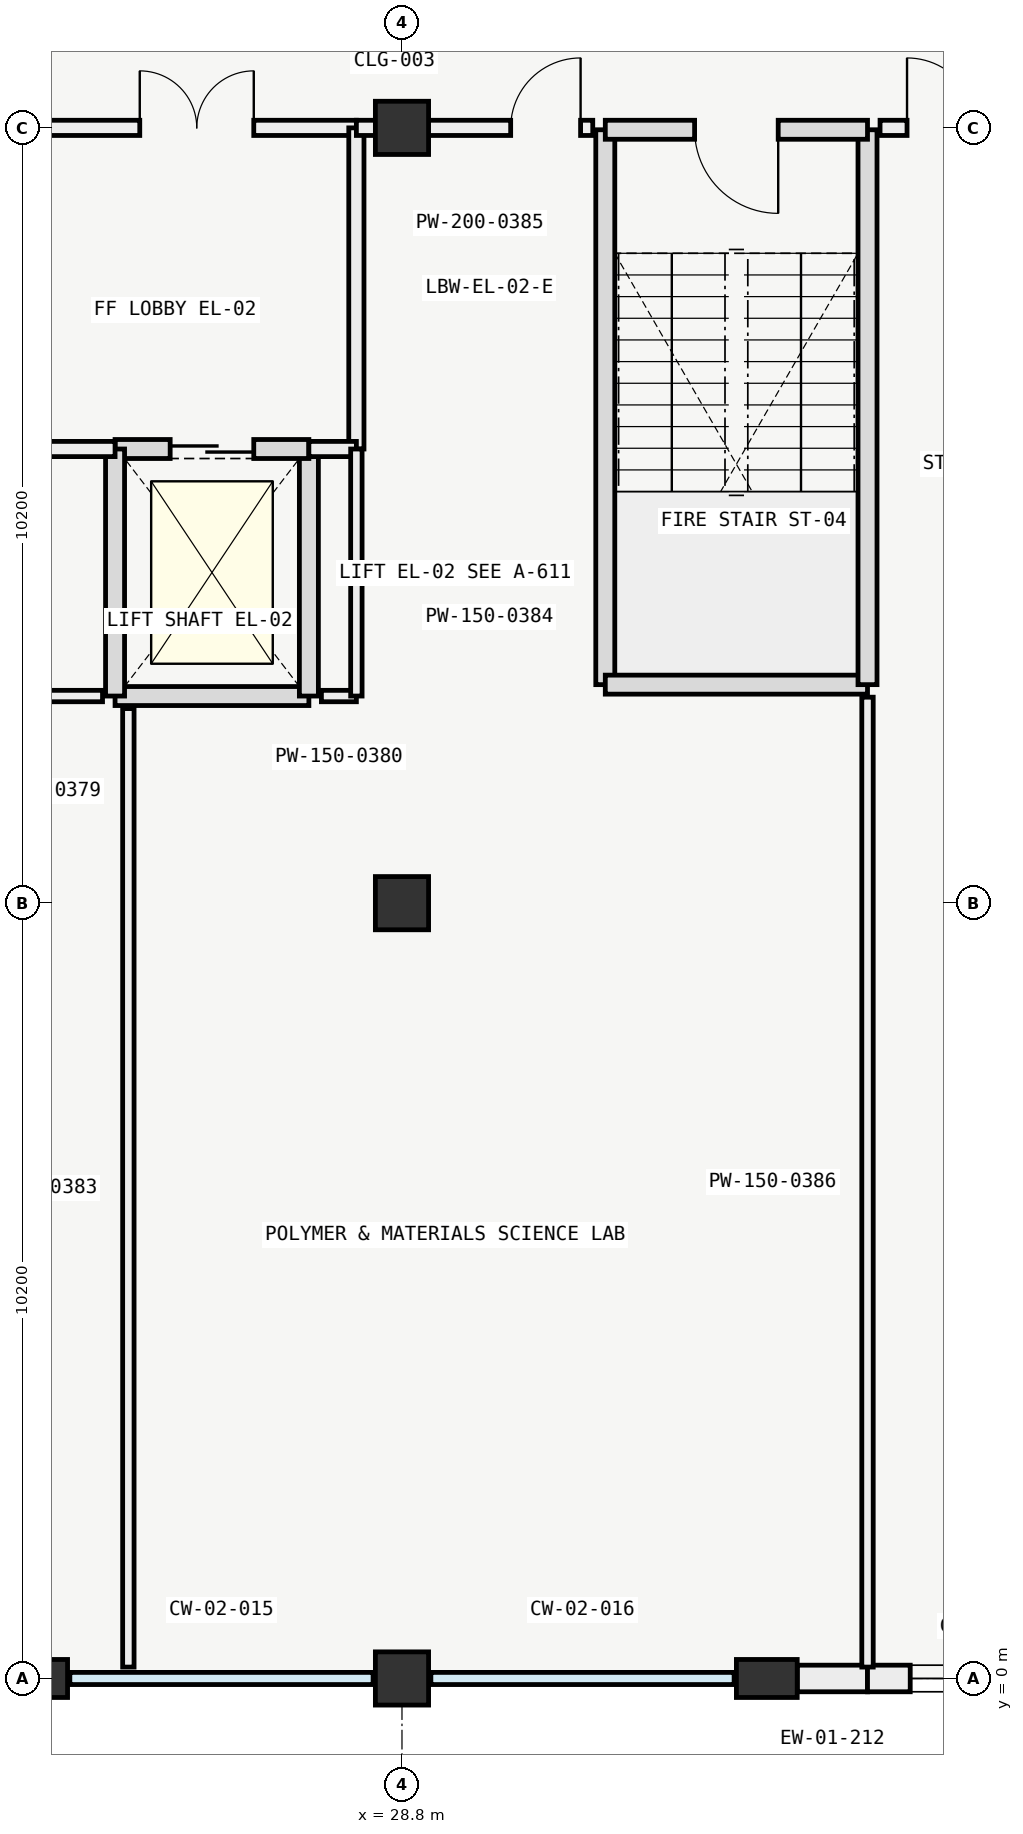
"""IFC4 building model, lengths in metres.
Left out: names, types, materials, properties, quantities, classifications, styles, units other than length and angle.
Written with IfcOpenShell. Run it as: python <this file> out.ifc"""

import sys

from ifc_helpers import new_model, si_unit, direction, frame, frame_2d, origin, origin_2d, place, context, subcontext, project, spatial, rectangle, extrude, element, fill, save


model = new_model("IFC4")
c1 = context("Model", 3, precision=1e-05, world=origin(), true_north=direction((0.0, 1.0)))
c2 = subcontext(c1, "Body", "Model", "MODEL_VIEW")
j1 = project(units=[si_unit("LENGTHUNIT", "METRE"), si_unit("PLANEANGLEUNIT", "RADIAN")], contexts=[c1])
p1 = place(None, origin())
s1 = spatial("IfcSite", under=j1, at=p1, CompositionType="ELEMENT")
p2 = place(p1, origin())
s2 = spatial("IfcBuilding", under=s1, at=p2, CompositionType="ELEMENT")
p3 = place(p2, frame((0.0, 0.0, 9.6)))
s3 = spatial("IfcBuildingStorey", under=s2, at=p3, CompositionType="ELEMENT", Elevation=9.6)
for number, where, z_axis, x_axis in (
    (1, (28.8, 0.0, 0.0), (0.0, 0.0, 1.0), (1.0, 0.0, 0.0)),
    (2, (28.8, 10.2, 0.0), (0.0, 0.0, 1.0), (1.0, 0.0, 0.0)),
    (3, (28.8, 20.4, 0.0), (0.0, 0.0, 1.0), (1.0, 0.0, 0.0)),
):
    element("IfcColumn", number, at=place(p3, frame(where, z_axis=z_axis, x_axis=x_axis)), inside=s3, PredefinedType="COLUMN", context=c2, shape_type="SweptSolid", body=[
        extrude(rectangle(XDim=0.7, YDim=0.7, at=origin_2d()), origin(), (0.0, 0.0, 1.0), 4.2),
    ])
for number, where, z_axis, x_axis in (
    (4, (24.0, 0.0, 0.0), (0.0, 0.0, 1.0), (0.0, 1.0, 0.0)),
    (5, (33.6, 0.0, 0.0), (0.0, 0.0, 1.0), (0.0, 1.0, 0.0)),
):
    element("IfcColumn", number, at=place(p3, frame(where, z_axis=z_axis, x_axis=x_axis)), inside=s3, PredefinedType="PILASTER", context=c2, shape_type="SweptSolid", body=[
        extrude(rectangle(XDim=0.5, YDim=0.8, at=origin_2d()), origin(), (0.0, 0.0, 1.0), 4.2),
    ])
p4 = place(p3, frame((34.925, 0.0, 0.0), z_axis=(0.0, 0.0, 1.0), x_axis=(-1.0, 0.0, 0.0)))
e6 = element("IfcWall", 6, at=p4, inside=s3, PredefinedType="SOLIDWALL", context=c2, shape_type="SweptSolid", body=[
    extrude(rectangle(XDim=0.924, YDim=0.35, at=frame_2d((0.462, 0.0))), origin(), (0.0, 0.0, 1.0), 2.723),
])
p5 = place(p3, frame((38.049, 0.0, 0.0), z_axis=(0.0, 0.0, 1.0), x_axis=(-1.0, 0.0, 0.0)))
e7 = element("IfcWall", 7, at=p5, inside=s3, PredefinedType="SOLIDWALL", context=c2, shape_type="SweptSolid", body=[
    extrude(rectangle(XDim=3.124, YDim=0.35, at=frame_2d((1.562, 0.0))), origin(), (0.0, 0.0, 1.0), 2.723),
])
p6 = place(p5, frame((0.562, 0.0, 0.8)))
e8 = element("IfcOpeningElement", 8, at=p6, cuts=e7, PredefinedType="OPENING", context=c2, shape_type="SweptSolid", body=[
    extrude(rectangle(XDim=2.0, YDim=1.35, at=frame_2d((1.0, 0.675))), frame((0.0, 0.185, 0.0), z_axis=(0.0, -1.0, 0.0), x_axis=(1.0, 0.0, 0.0)), (0.0, 0.0, 1.0), 0.37),
])
p7 = place(p3, frame((31.475, 20.375, 0.0), z_axis=(0.0, 0.0, 1.0), x_axis=(0.0, -1.0, 0.0)))
e9 = element("IfcWall", 9, at=p7, inside=s3, PredefinedType="SOLIDWALL", context=c2, shape_type="SweptSolid", body=[
    extrude(rectangle(XDim=7.3, YDim=0.25, at=frame_2d((3.65, 0.0))), origin(), (0.0, 0.0, 1.0), 3.95),
])
p8 = place(p3, frame((31.475, 13.075, 0.0), z_axis=(0.0, 0.0, 1.0), x_axis=(1.0, 0.0, 0.0)))
e10 = element("IfcWall", 10, at=p8, inside=s3, PredefinedType="SOLIDWALL", context=c2, shape_type="SweptSolid", body=[
    extrude(rectangle(XDim=3.45, YDim=0.25, at=frame_2d((1.725, 0.0))), origin(), (0.0, 0.0, 1.0), 3.95),
])
p9 = place(p3, frame((34.925, 13.075, 0.0), z_axis=(0.0, 0.0, 1.0), x_axis=(0.0, 1.0, 0.0)))
e11 = element("IfcWall", 11, at=p9, inside=s3, PredefinedType="SOLIDWALL", context=c2, shape_type="SweptSolid", body=[
    extrude(rectangle(XDim=7.3, YDim=0.25, at=frame_2d((3.65, 0.0))), origin(), (0.0, 0.0, 1.0), 3.95),
])
p10 = place(p3, frame((34.925, 20.375, 0.0), z_axis=(0.0, 0.0, 1.0), x_axis=(-1.0, 0.0, 0.0)))
e12 = element("IfcWall", 12, at=p10, inside=s3, PredefinedType="SOLIDWALL", context=c2, shape_type="SweptSolid", body=[
    extrude(rectangle(XDim=3.45, YDim=0.25, at=frame_2d((1.725, 0.0))), origin(), (0.0, 0.0, 1.0), 3.95),
])
p11 = place(p10, frame((1.175, 0.0, 0.0)))
e13 = element("IfcOpeningElement", 13, at=p11, cuts=e12, PredefinedType="OPENING", context=c2, shape_type="SweptSolid", body=[
    extrude(rectangle(XDim=1.1, YDim=2.2, at=frame_2d((0.55, 1.1))), frame((0.0, 0.135, 0.0), z_axis=(0.0, -1.0, 0.0), x_axis=(1.0, 0.0, 0.0)), (0.0, 0.0, 1.0), 0.27),
])
p12 = place(p3, frame((25.025, 12.925, 0.0), z_axis=(0.0, 0.0, 1.0), x_axis=(1.0, 0.0, 0.0)))
e14 = element("IfcWall", 14, at=p12, inside=s3, PredefinedType="SOLIDWALL", context=c2, shape_type="SweptSolid", body=[
    extrude(rectangle(XDim=2.55, YDim=0.25, at=frame_2d((1.275, 0.0))), origin(), (0.0, 0.0, 1.0), 3.95),
])
p13 = place(p3, frame((27.575, 12.925, 0.0), z_axis=(0.0, 0.0, 1.0), x_axis=(0.0, 1.0, 0.0)))
e15 = element("IfcWall", 15, at=p13, inside=s3, PredefinedType="SOLIDWALL", context=c2, shape_type="SweptSolid", body=[
    extrude(rectangle(XDim=3.25, YDim=0.25, at=frame_2d((1.625, 0.0))), origin(), (0.0, 0.0, 1.0), 3.95),
])
p14 = place(p3, frame((27.575, 16.175, 0.0), z_axis=(0.0, 0.0, 1.0), x_axis=(-1.0, 0.0, 0.0)))
e16 = element("IfcWall", 16, at=p14, inside=s3, PredefinedType="SOLIDWALL", context=c2, shape_type="SweptSolid", body=[
    extrude(rectangle(XDim=2.55, YDim=0.25, at=frame_2d((1.275, 0.0))), origin(), (0.0, 0.0, 1.0), 3.95),
])
p15 = place(p14, frame((0.725, 0.0, 0.0)))
e17 = element("IfcOpeningElement", 17, at=p15, cuts=e16, PredefinedType="OPENING", context=c2, shape_type="SweptSolid", body=[
    extrude(rectangle(XDim=1.1, YDim=2.1, at=frame_2d((0.55, 1.05))), frame((0.0, 0.135, 0.0), z_axis=(0.0, -1.0, 0.0), x_axis=(1.0, 0.0, 0.0)), (0.0, 0.0, 1.0), 0.27),
])
p16 = place(p3, frame((25.025, 16.175, 0.0), z_axis=(0.0, 0.0, 1.0), x_axis=(0.0, -1.0, 0.0)))
e18 = element("IfcWall", 18, at=p16, inside=s3, PredefinedType="SOLIDWALL", context=c2, shape_type="SweptSolid", body=[
    extrude(rectangle(XDim=3.25, YDim=0.25, at=frame_2d((1.625, 0.0))), origin(), (0.0, 0.0, 1.0), 3.95),
])
p17 = place(p3, frame((24.0, 20.4, 0.0), z_axis=(0.0, 0.0, 1.0), x_axis=(1.0, 0.0, 0.0)))
e19 = element("IfcWall", 19, at=p17, inside=s3, PredefinedType="PARTITIONING", context=c2, shape_type="SweptSolid", body=[
    extrude(rectangle(XDim=4.2, YDim=0.2, at=frame_2d((2.1, 0.0))), origin(), (0.0, 0.0, 1.0), 3.33),
])
p18 = place(p17, frame((1.35, 0.0, 0.0)))
e20 = element("IfcOpeningElement", 20, at=p18, cuts=e19, PredefinedType="OPENING", context=c2, shape_type="SweptSolid", body=[
    extrude(rectangle(XDim=1.5, YDim=2.2, at=frame_2d((0.75, 1.1))), frame((0.0, 0.11, 0.0), z_axis=(0.0, -1.0, 0.0), x_axis=(1.0, 0.0, 0.0)), (0.0, 0.0, 1.0), 0.22),
])
p19 = place(p3, frame((28.2, 16.175, 0.0), z_axis=(0.0, 0.0, 1.0), x_axis=(0.0, 1.0, 0.0)))
e21 = element("IfcWall", 21, at=p19, inside=s3, PredefinedType="PARTITIONING", context=c2, shape_type="SweptSolid", body=[
    extrude(rectangle(XDim=4.225, YDim=0.2, at=frame_2d((2.112, 0.0))), origin(), (0.0, 0.0, 1.0), 3.33),
])
p20 = place(p3, frame((24.0, 16.175, 0.0), z_axis=(0.0, 0.0, 1.0), x_axis=(1.0, 0.0, 0.0)))
e22 = element("IfcWall", 22, at=p20, inside=s3, PredefinedType="PARTITIONING", context=c2, shape_type="SweptSolid", body=[
    extrude(rectangle(XDim=1.025, YDim=0.2, at=frame_2d((0.512, 0.0))), origin(), (0.0, 0.0, 1.0), 3.55),
])
p21 = place(p3, frame((27.575, 16.175, 0.0), z_axis=(0.0, 0.0, 1.0), x_axis=(1.0, 0.0, 0.0)))
e23 = element("IfcWall", 23, at=p21, inside=s3, PredefinedType="PARTITIONING", context=c2, shape_type="SweptSolid", body=[
    extrude(rectangle(XDim=0.625, YDim=0.2, at=frame_2d((0.312, 0.0))), origin(), (0.0, 0.0, 1.0), 3.55),
])
p22 = place(p3, frame((23.14, 12.925, 0.0), z_axis=(0.0, 0.0, 1.0), x_axis=(1.0, 0.0, 0.0)))
e24 = element("IfcWall", 24, at=p22, inside=s3, PredefinedType="PARTITIONING", context=c2, shape_type="SweptSolid", body=[
    extrude(rectangle(XDim=1.72, YDim=0.15, at=frame_2d((0.86, 0.0))), origin(), (0.0, 0.0, 1.0), 3.85),
])
p23 = place(p3, frame((27.74, 12.925, 0.0), z_axis=(0.0, 0.0, 1.0), x_axis=(1.0, 0.0, 0.0)))
e25 = element("IfcWall", 25, at=p23, inside=s3, PredefinedType="PARTITIONING", context=c2, shape_type="SweptSolid", body=[
    extrude(rectangle(XDim=0.46, YDim=0.15, at=frame_2d((0.23, 0.0))), origin(), (0.0, 0.0, 1.0), 3.85),
])
p24 = place(p3, frame((25.2, 0.15, 0.0), z_axis=(0.0, 0.0, 1.0), x_axis=(0.0, 1.0, 0.0)))
e26 = element("IfcWall", 26, at=p24, inside=s3, PredefinedType="PARTITIONING", context=c2, shape_type="SweptSolid", body=[
    extrude(rectangle(XDim=12.61, YDim=0.15, at=frame_2d((6.305, 0.0))), origin(), (0.0, 0.0, 1.0), 3.33),
])
p25 = place(p3, frame((28.2, 12.925, 0.0), z_axis=(0.0, 0.0, 1.0), x_axis=(0.0, 1.0, 0.0)))
e27 = element("IfcWall", 27, at=p25, inside=s3, PredefinedType="PARTITIONING", context=c2, shape_type="SweptSolid", body=[
    extrude(rectangle(XDim=3.25, YDim=0.15, at=frame_2d((1.625, 0.0))), origin(), (0.0, 0.0, 1.0), 3.85),
])
p26 = place(p3, frame((28.2, 20.4, 0.0), z_axis=(0.0, 0.0, 1.0), x_axis=(1.0, 0.0, 0.0)))
e28 = element("IfcWall", 28, at=p26, inside=s3, PredefinedType="PARTITIONING", context=c2, shape_type="SweptSolid", body=[
    extrude(rectangle(XDim=3.11, YDim=0.2, at=frame_2d((1.555, 0.0))), origin(), (0.0, 0.0, 1.0), 3.28),
])
p27 = place(p26, frame((2.03, 0.0, 0.0)))
e29 = element("IfcOpeningElement", 29, at=p27, cuts=e28, PredefinedType="OPENING", context=c2, shape_type="SweptSolid", body=[
    extrude(rectangle(XDim=0.92, YDim=2.1, at=frame_2d((0.46, 1.05))), frame((0.0, 0.11, 0.0), z_axis=(0.0, -1.0, 0.0), x_axis=(1.0, 0.0, 0.0)), (0.0, 0.0, 1.0), 0.22),
])
p28 = place(p3, frame((34.925, 0.15, 0.0), z_axis=(0.0, 0.0, 1.0), x_axis=(0.0, 1.0, 0.0)))
e30 = element("IfcWall", 30, at=p28, inside=s3, PredefinedType="PARTITIONING", context=c2, shape_type="SweptSolid", body=[
    extrude(rectangle(XDim=12.76, YDim=0.15, at=frame_2d((6.38, 0.0))), origin(), (0.0, 0.0, 1.0), 3.33),
])
p29 = place(p3, frame((35.09, 20.4, 0.0), z_axis=(0.0, 0.0, 1.0), x_axis=(1.0, 0.0, 0.0)))
e31 = element("IfcWall", 31, at=p29, inside=s3, PredefinedType="PARTITIONING", context=c2, shape_type="SweptSolid", body=[
    extrude(rectangle(XDim=12.76, YDim=0.2, at=frame_2d((6.38, 0.0))), origin(), (0.0, 0.0, 1.0), 3.28),
])
p30 = place(p29, frame((0.355, 0.0, 0.0)))
e32 = element("IfcOpeningElement", 32, at=p30, cuts=e31, PredefinedType="OPENING", context=c2, shape_type="SweptSolid", body=[
    extrude(rectangle(XDim=0.92, YDim=2.1, at=frame_2d((0.46, 1.05))), frame((0.0, 0.11, 0.0), z_axis=(0.0, -1.0, 0.0), x_axis=(1.0, 0.0, 0.0)), (0.0, 0.0, 1.0), 0.22),
])
p31 = place(p6, origin())
e33 = element("IfcWindow", 33, at=p31, inside=s3, PartitioningType="SINGLE_PANEL", PredefinedType="WINDOW", context=c2, shape_type="SweptSolid", body=[
    extrude(rectangle(XDim=2.0, YDim=1.35, at=frame_2d((1.0, 0.675))), frame((0.0, 0.03, 0.0), z_axis=(0.0, -1.0, 0.0), x_axis=(1.0, 0.0, 0.0)), (0.0, 0.0, 1.0), 0.06),
])
fill(e8, e33)
p32 = place(p11, origin())
e34 = element("IfcDoor", 34, at=p32, inside=s3, OperationType="SINGLE_SWING_LEFT", PredefinedType="DOOR", context=c2, shape_type="SweptSolid", body=[
    extrude(rectangle(XDim=1.1, YDim=2.2, at=frame_2d((0.55, 1.1))), frame((0.0, 0.025, 0.0), z_axis=(0.0, -1.0, 0.0), x_axis=(1.0, 0.0, 0.0)), (0.0, 0.0, 1.0), 0.05),
])
fill(e13, e34)
p33 = place(p15, origin())
e35 = element("IfcDoor", 35, at=p33, inside=s3, OperationType="SLIDING_TO_LEFT", PredefinedType="DOOR", context=c2, shape_type="SweptSolid", body=[
    extrude(rectangle(XDim=1.1, YDim=2.1, at=frame_2d((0.55, 1.05))), frame((0.0, 0.025, 0.0), z_axis=(0.0, -1.0, 0.0), x_axis=(1.0, 0.0, 0.0)), (0.0, 0.0, 1.0), 0.05),
])
fill(e17, e35)
p34 = place(p18, origin())
e36 = element("IfcDoor", 36, at=p34, inside=s3, OperationType="SINGLE_SWING_LEFT", PredefinedType="DOOR", context=c2, shape_type="SweptSolid", body=[
    extrude(rectangle(XDim=1.5, YDim=2.2, at=frame_2d((0.75, 1.1))), frame((0.0, 0.025, 0.0), z_axis=(0.0, -1.0, 0.0), x_axis=(1.0, 0.0, 0.0)), (0.0, 0.0, 1.0), 0.05),
])
fill(e20, e36)
p35 = place(p27, origin())
e37 = element("IfcDoor", 37, at=p35, inside=s3, OperationType="SINGLE_SWING_RIGHT", PredefinedType="DOOR", context=c2, shape_type="SweptSolid", body=[
    extrude(rectangle(XDim=0.92, YDim=2.1, at=frame_2d((0.46, 1.05))), frame((0.0, 0.025, 0.0), z_axis=(0.0, -1.0, 0.0), x_axis=(1.0, 0.0, 0.0)), (0.0, 0.0, 1.0), 0.05),
])
fill(e29, e37)
p36 = place(p30, origin())
e38 = element("IfcDoor", 38, at=p36, inside=s3, OperationType="SINGLE_SWING_LEFT", PredefinedType="DOOR", context=c2, shape_type="SweptSolid", body=[
    extrude(rectangle(XDim=0.92, YDim=2.1, at=frame_2d((0.46, 1.05))), frame((0.0, 0.025, 0.0), z_axis=(0.0, -1.0, 0.0), x_axis=(1.0, 0.0, 0.0)), (0.0, 0.0, 1.0), 0.05),
])
fill(e32, e38)
save(model, sys.argv[1])
